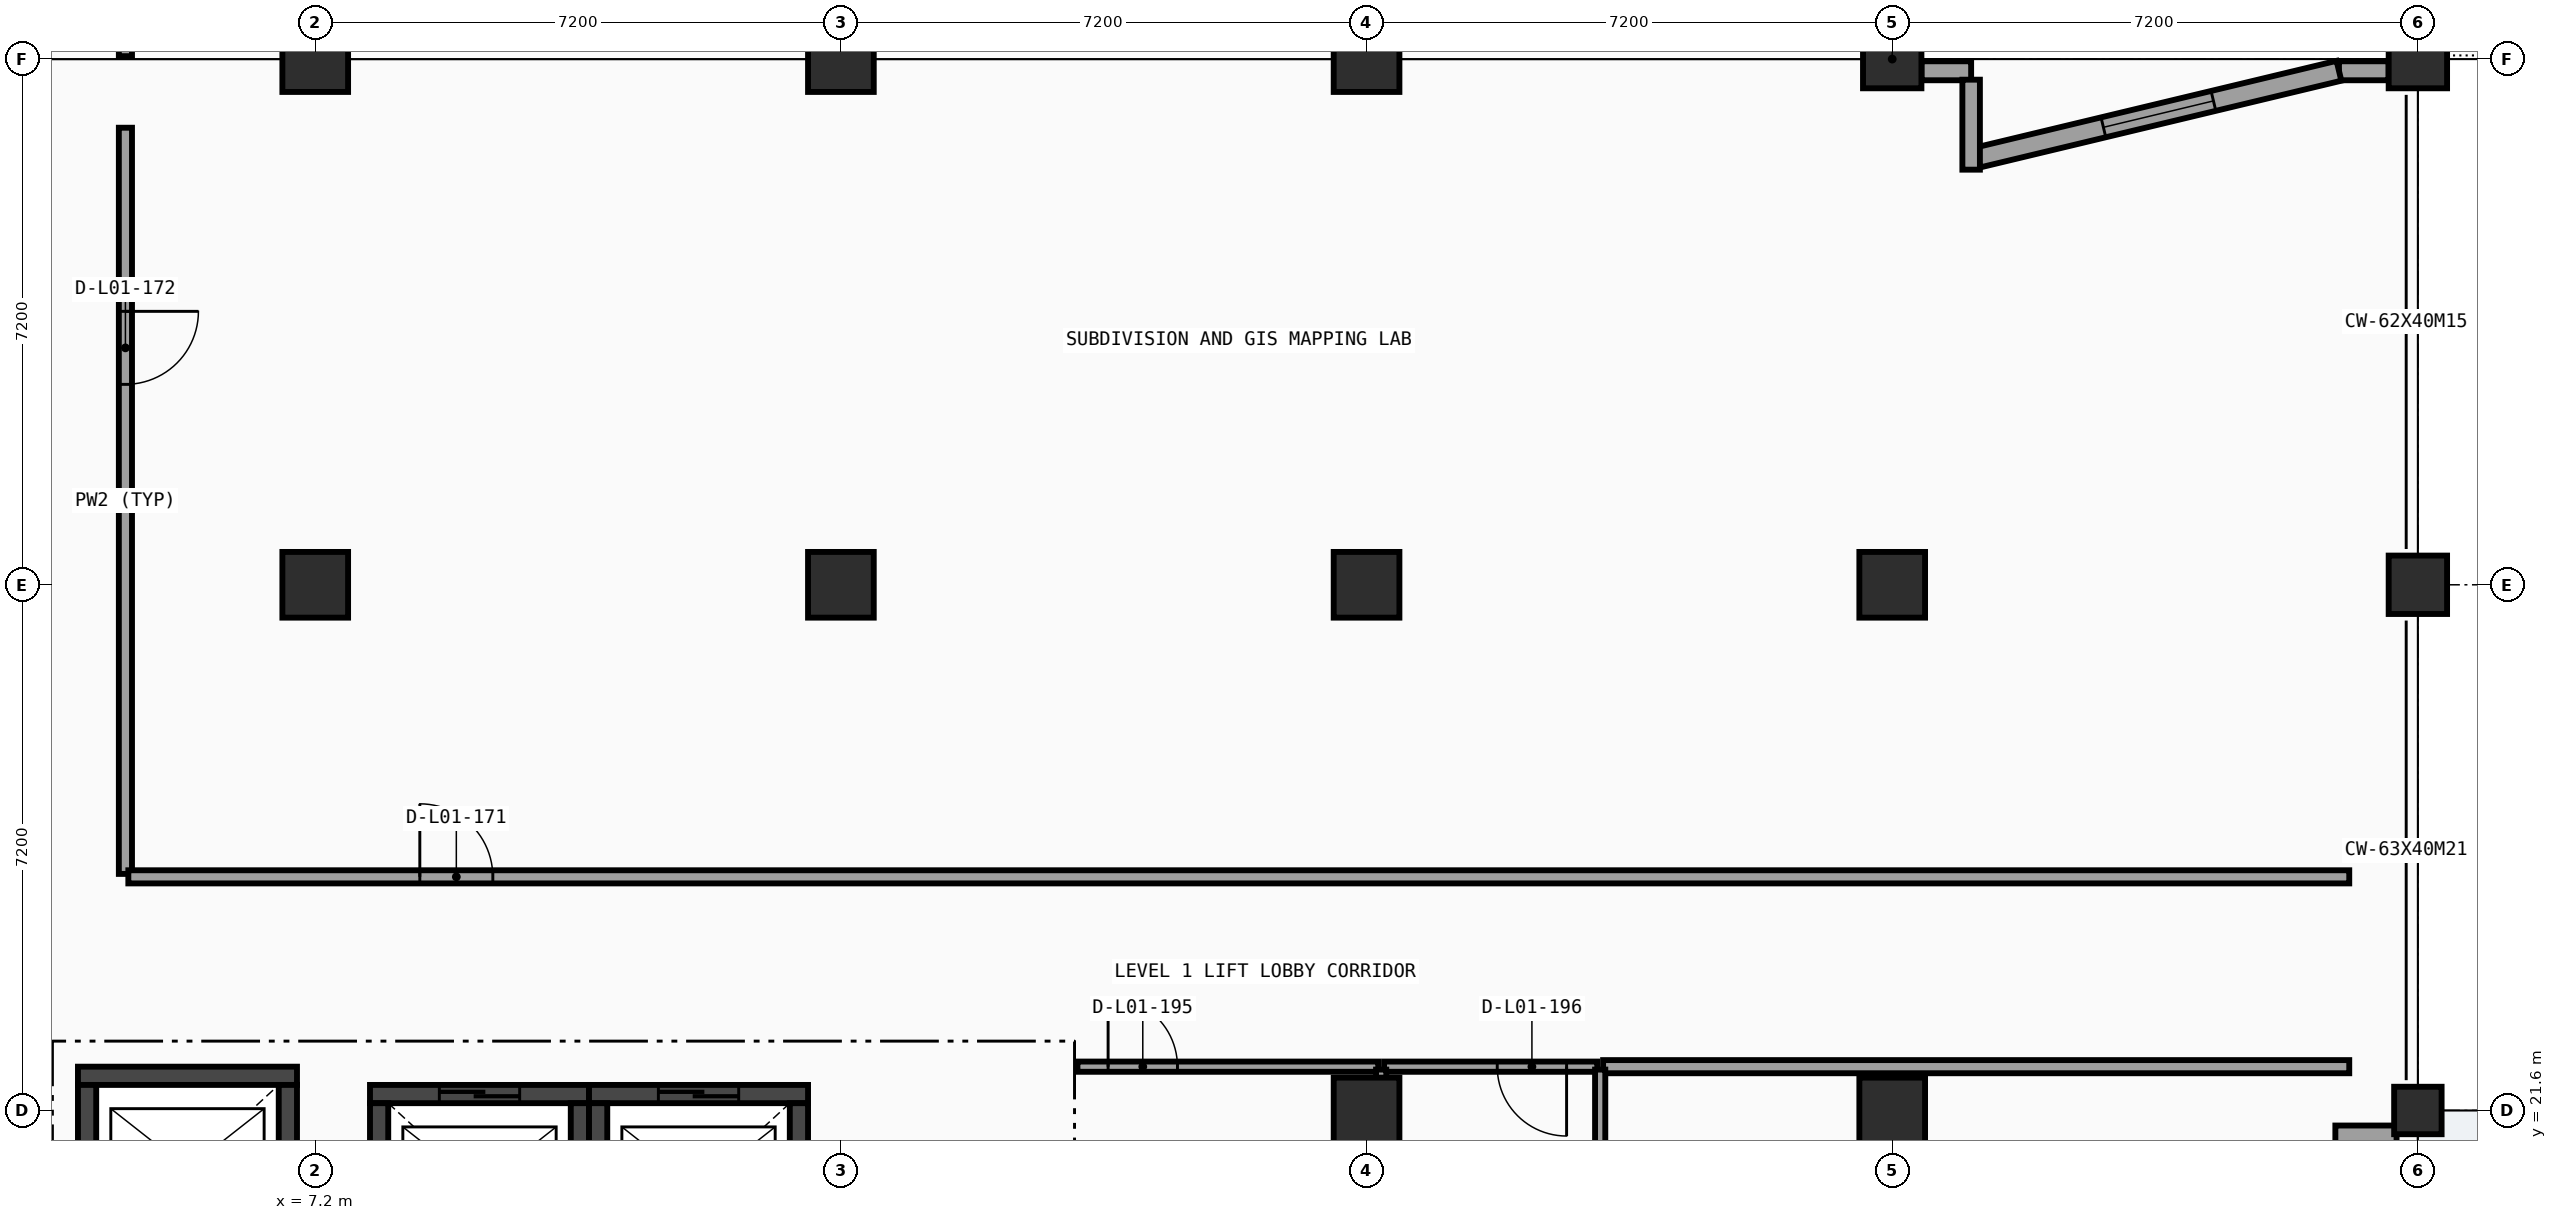
"""IFC4 building model, lengths in metres.
Left out: names, types, materials, properties, quantities, classifications, styles, units other than length and angle.
Written with IfcOpenShell. Run it as: python <this file> out.ifc"""

import sys

from ifc_helpers import new_model, si_unit, direction, frame, frame_2d, origin, origin_2d, place, context, subcontext, project, spatial, rectangle, extrude, element, fill, save


model = new_model("IFC4")
c1 = context("Model", 3, precision=1e-05, world=origin(), true_north=direction((0.0, 1.0)))
c2 = subcontext(c1, "Body", "Model", "MODEL_VIEW")
j1 = project(units=[si_unit("LENGTHUNIT", "METRE"), si_unit("PLANEANGLEUNIT", "RADIAN")], contexts=[c1])
p1 = place(None, origin())
s1 = spatial("IfcSite", under=j1, at=p1, CompositionType="ELEMENT")
p2 = place(p1, origin())
s2 = spatial("IfcBuilding", under=s1, at=p2, CompositionType="ELEMENT")
p3 = place(p2, frame((0.0, 0.0, 5.4)))
s3 = spatial("IfcBuildingStorey", under=s2, at=p3, CompositionType="ELEMENT", Elevation=5.4)
for number, where, z_axis, x_axis in (
    (1, (7.2, 28.8, 0.0), (0.0, 0.0, 1.0), (1.0, 0.0, 0.0)),
    (2, (7.2, 36.0, 0.0), (0.0, 0.0, 1.0), (1.0, 0.0, 0.0)),
    (3, (14.4, 28.8, 0.0), (0.0, 0.0, 1.0), (1.0, 0.0, 0.0)),
    (4, (14.4, 36.0, 0.0), (0.0, 0.0, 1.0), (1.0, 0.0, 0.0)),
    (5, (21.6, 21.6, 0.0), (0.0, 0.0, 1.0), (1.0, 0.0, 0.0)),
    (6, (21.6, 28.8, 0.0), (0.0, 0.0, 1.0), (1.0, 0.0, 0.0)),
    (7, (21.6, 36.0, 0.0), (0.0, 0.0, 1.0), (1.0, 0.0, 0.0)),
    (8, (28.8, 21.6, 0.0), (0.0, 0.0, 1.0), (1.0, 0.0, 0.0)),
    (9, (28.8, 28.8, 0.0), (0.0, 0.0, 1.0), (1.0, 0.0, 0.0)),
):
    element("IfcColumn", number, at=place(p3, frame(where, z_axis=z_axis, x_axis=x_axis)), inside=s3, PredefinedType="COLUMN", context=c2, shape_type="SweptSolid", body=[
        extrude(rectangle(XDim=0.9, YDim=0.9, at=origin_2d()), origin(), (0.0, 0.0, 1.0), 4.8),
    ])
p4 = place(p3, frame((28.8, 36.0, 0.0), z_axis=(0.0, 0.0, 1.0), x_axis=(1.0, 0.0, 0.0)))
e10 = element("IfcColumn", 10, at=p4, inside=s3, PredefinedType="COLUMN", context=c2, shape_type="SweptSolid", body=[
    extrude(rectangle(XDim=0.8, YDim=0.8, at=origin_2d()), origin(), (0.0, 0.0, 1.0), 4.8),
])
p5 = place(p3, frame((36.0, 21.6, 0.0), z_axis=(0.0, 0.0, 1.0), x_axis=(1.0, 0.0, 0.0)))
e11 = element("IfcColumn", 11, at=p5, inside=s3, PredefinedType="COLUMN", context=c2, shape_type="SweptSolid", body=[
    extrude(rectangle(XDim=0.65, YDim=0.65, at=origin_2d()), origin(), (0.0, 0.0, 1.0), 4.8),
])
for number, where, z_axis, x_axis in (
    (12, (36.0, 28.8, 0.0), (0.0, 0.0, 1.0), (1.0, 0.0, 0.0)),
    (13, (36.0, 36.0, 0.0), (0.0, 0.0, 1.0), (1.0, 0.0, 0.0)),
):
    element("IfcColumn", number, at=place(p3, frame(where, z_axis=z_axis, x_axis=x_axis)), inside=s3, PredefinedType="COLUMN", context=c2, shape_type="SweptSolid", body=[
        extrude(rectangle(XDim=0.8, YDim=0.8, at=origin_2d()), origin(), (0.0, 0.0, 1.0), 4.8),
    ])
p6 = place(p3, frame((35.037, 21.182, 0.0), z_axis=(0.0, 0.0, 1.0), x_axis=(0.233440062358, -0.972371193159, 0.0)))
e14 = element("IfcWall", 14, at=p6, inside=s3, PredefinedType="SOLIDWALL", context=c2, shape_type="SweptSolid", body=[
    extrude(rectangle(XDim=3.44, YDim=0.28, at=frame_2d((1.72, 0.0))), origin(), (0.0, 0.0, 1.0), 3.201),
])
p7 = place(p6, frame((0.945, 0.0, 0.8)))
e15 = element("IfcOpeningElement", 15, at=p7, cuts=e14, PredefinedType="OPENING", context=c2, shape_type="SweptSolid", body=[
    extrude(rectangle(XDim=1.55, YDim=1.8, at=frame_2d((0.775, 0.9))), frame((0.0, 0.15, 0.0), z_axis=(0.0, -1.0, 0.0), x_axis=(1.0, 0.0, 0.0)), (0.0, 0.0, 1.0), 0.3),
])
p8 = place(p3, frame((34.87, 21.274, 0.0), z_axis=(0.0, 0.0, 1.0), x_axis=(1.0, 0.0, 0.0)))
e16 = element("IfcWall", 16, at=p8, inside=s3, PredefinedType="SOLIDWALL", context=c2, shape_type="SweptSolid", body=[
    extrude(rectangle(XDim=0.838, YDim=0.24, at=frame_2d((0.419, 0.0))), origin(), (0.0, 0.0, 1.0), 3.201),
])
for number, where, z_axis, x_axis in (
    (17, (29.201, 35.84, 0.0), (0.0, 0.0, 1.0), (1.0, 0.0, 0.0)),
    (18, (34.919, 35.84, 0.0), (0.0, 0.0, 1.0), (1.0, 0.0, 0.0)),
):
    element("IfcWall", number, at=place(p3, frame(where, z_axis=z_axis, x_axis=x_axis)), inside=s3, PredefinedType="SOLIDWALL", context=c2, shape_type="SweptSolid", body=[
        extrude(rectangle(XDim=0.68, YDim=0.26, at=frame_2d((0.34, 0.0))), origin(), (0.0, 0.0, 1.0), 3.751),
    ])
p9 = place(p3, frame((29.973, 34.653, 0.0), z_axis=(0.0, 0.0, 1.0), x_axis=(0.972362024801, 0.233478248933, 0.0)))
e19 = element("IfcWall", 19, at=p9, inside=s3, PredefinedType="SOLIDWALL", context=c2, shape_type="SweptSolid", body=[
    extrude(rectangle(XDim=5.086, YDim=0.28, at=frame_2d((2.543, 0.0))), origin(), (0.0, 0.0, 1.0), 3.751),
])
p10 = place(p9, frame((1.768, 0.0, 0.8)))
e20 = element("IfcOpeningElement", 20, at=p10, cuts=e19, PredefinedType="OPENING", context=c2, shape_type="SweptSolid", body=[
    extrude(rectangle(XDim=1.55, YDim=1.8, at=frame_2d((0.775, 0.9))), frame((0.0, 0.15, 0.0), z_axis=(0.0, -1.0, 0.0), x_axis=(1.0, 0.0, 0.0)), (0.0, 0.0, 1.0), 0.3),
])
p11 = place(p3, frame((29.881, 34.486, 0.0), z_axis=(0.0, 0.0, 1.0), x_axis=(0.0, 1.0, 0.0)))
e21 = element("IfcWall", 21, at=p11, inside=s3, PredefinedType="SOLIDWALL", context=c2, shape_type="SweptSolid", body=[
    extrude(rectangle(XDim=1.232, YDim=0.24, at=frame_2d((0.616, 0.0))), origin(), (0.0, 0.0, 1.0), 4.52),
])
p12 = place(p3, frame((6.95, 22.075, 0.0), z_axis=(0.0, 0.0, 1.0), x_axis=(-1.0, 0.0, 0.0)))
e22 = element("IfcWall", 22, at=p12, inside=s3, PredefinedType="SHEAR", context=c2, shape_type="SweptSolid", body=[
    extrude(rectangle(XDim=3.0, YDim=0.25, at=frame_2d((1.5, 0.0))), origin(), (0.0, 0.0, 1.0), 4.52),
])
for number, where, z_axis, x_axis in (
    (23, (4.075, 21.95, 0.0), (0.0, 0.0, 1.0), (0.0, -1.0, 0.0)),
    (24, (6.825, 19.65, 0.0), (0.0, 0.0, 1.0), (0.0, 1.0, 0.0)),
):
    element("IfcWall", number, at=place(p3, frame(where, z_axis=z_axis, x_axis=x_axis)), inside=s3, PredefinedType="SHEAR", context=c2, shape_type="SweptSolid", body=[
        extrude(rectangle(XDim=2.3, YDim=0.25, at=frame_2d((1.15, 0.0))), origin(), (0.0, 0.0, 1.0), 4.52),
    ])
p13 = place(p3, frame((10.95, 21.825, 0.0), z_axis=(0.0, 0.0, 1.0), x_axis=(-1.0, 0.0, 0.0)))
e25 = element("IfcWall", 25, at=p13, inside=s3, PredefinedType="SHEAR", context=c2, shape_type="SweptSolid", body=[
    extrude(rectangle(XDim=3.0, YDim=0.25, at=frame_2d((1.5, 0.0))), origin(), (0.0, 0.0, 1.0), 4.52),
])
p14 = place(p13, frame((0.95, 0.0, 0.0)))
e26 = element("IfcOpeningElement", 26, at=p14, cuts=e25, PredefinedType="OPENING", context=c2, shape_type="SweptSolid", body=[
    extrude(rectangle(XDim=1.1, YDim=2.1, at=frame_2d((0.55, 1.05))), frame((0.0, 0.135, 0.0), z_axis=(0.0, -1.0, 0.0), x_axis=(1.0, 0.0, 0.0)), (0.0, 0.0, 1.0), 0.27),
])
for number, where, z_axis, x_axis in (
    (27, (8.075, 21.7, 0.0), (0.0, 0.0, 1.0), (0.0, -1.0, 0.0)),
    (28, (10.825, 19.4, 0.0), (0.0, 0.0, 1.0), (0.0, 1.0, 0.0)),
):
    element("IfcWall", number, at=place(p3, frame(where, z_axis=z_axis, x_axis=x_axis)), inside=s3, PredefinedType="SHEAR", context=c2, shape_type="SweptSolid", body=[
        extrude(rectangle(XDim=2.3, YDim=0.25, at=frame_2d((1.15, 0.0))), origin(), (0.0, 0.0, 1.0), 4.52),
    ])
p15 = place(p3, frame((13.95, 21.825, 0.0), z_axis=(0.0, 0.0, 1.0), x_axis=(-1.0, 0.0, 0.0)))
e29 = element("IfcWall", 29, at=p15, inside=s3, PredefinedType="SHEAR", context=c2, shape_type="SweptSolid", body=[
    extrude(rectangle(XDim=3.0, YDim=0.25, at=frame_2d((1.5, 0.0))), origin(), (0.0, 0.0, 1.0), 4.52),
])
p16 = place(p15, frame((0.95, 0.0, 0.0)))
e30 = element("IfcOpeningElement", 30, at=p16, cuts=e29, PredefinedType="OPENING", context=c2, shape_type="SweptSolid", body=[
    extrude(rectangle(XDim=1.1, YDim=2.1, at=frame_2d((0.55, 1.05))), frame((0.0, 0.135, 0.0), z_axis=(0.0, -1.0, 0.0), x_axis=(1.0, 0.0, 0.0)), (0.0, 0.0, 1.0), 0.27),
])
for number, where, z_axis, x_axis in (
    (31, (11.075, 21.7, 0.0), (0.0, 0.0, 1.0), (0.0, -1.0, 0.0)),
    (32, (13.825, 19.4, 0.0), (0.0, 0.0, 1.0), (0.0, 1.0, 0.0)),
):
    element("IfcWall", number, at=place(p3, frame(where, z_axis=z_axis, x_axis=x_axis)), inside=s3, PredefinedType="SHEAR", context=c2, shape_type="SweptSolid", body=[
        extrude(rectangle(XDim=2.3, YDim=0.25, at=frame_2d((1.15, 0.0))), origin(), (0.0, 0.0, 1.0), 4.52),
    ])
p17 = place(p3, frame((4.6, 24.84, 0.0), z_axis=(0.0, 0.0, 1.0), x_axis=(0.0, 1.0, 0.0)))
e33 = element("IfcWall", 33, at=p17, inside=s3, PredefinedType="PARTITIONING", context=c2, shape_type="SweptSolid", body=[
    extrude(rectangle(XDim=10.22, YDim=0.18, at=frame_2d((5.11, 0.0))), origin(), (0.0, 0.0, 1.0), 3.889),
])
p18 = place(p17, frame((6.705, 0.0, 0.0)))
e34 = element("IfcOpeningElement", 34, at=p18, cuts=e33, PredefinedType="OPENING", context=c2, shape_type="SweptSolid", body=[
    extrude(rectangle(XDim=1.0, YDim=2.1, at=frame_2d((0.5, 1.05))), frame((0.0, 0.1, 0.0), z_axis=(0.0, -1.0, 0.0), x_axis=(1.0, 0.0, 0.0)), (0.0, 0.0, 1.0), 0.2),
])
p19 = place(p3, frame((4.6, 36.04, 0.0), z_axis=(0.0, 0.0, 1.0), x_axis=(0.0, 1.0, 0.0)))
e35 = element("IfcWall", 35, at=p19, inside=s3, PredefinedType="PARTITIONING", context=c2, shape_type="SweptSolid", body=[
    extrude(rectangle(XDim=14.32, YDim=0.18, at=frame_2d((7.16, 0.0))), origin(), (0.0, 0.0, 1.0), 3.889),
])
p20 = place(p19, frame((3.54, 0.0, 0.0)))
e36 = element("IfcOpeningElement", 36, at=p20, cuts=e35, PredefinedType="OPENING", context=c2, shape_type="SweptSolid", body=[
    extrude(rectangle(XDim=1.0, YDim=2.1, at=frame_2d((0.5, 1.05))), frame((0.0, 0.1, 0.0), z_axis=(0.0, -1.0, 0.0), x_axis=(1.0, 0.0, 0.0)), (0.0, 0.0, 1.0), 0.2),
])
p21 = place(p3, frame((24.84, 22.2, 0.0), z_axis=(0.0, 0.0, 1.0), x_axis=(1.0, 0.0, 0.0)))
e37 = element("IfcWall", 37, at=p21, inside=s3, PredefinedType="PARTITIONING", context=c2, shape_type="SweptSolid", body=[
    extrude(rectangle(XDim=10.22, YDim=0.18, at=frame_2d((5.11, 0.0))), origin(), (0.0, 0.0, 1.0), 3.801),
])
p22 = place(p3, frame((4.64, 24.8, 0.0), z_axis=(0.0, 0.0, 1.0), x_axis=(1.0, 0.0, 0.0)))
e38 = element("IfcWall", 38, at=p22, inside=s3, PredefinedType="PARTITIONING", context=c2, shape_type="SweptSolid", body=[
    extrude(rectangle(XDim=30.42, YDim=0.18, at=frame_2d((15.21, 0.0))), origin(), (0.0, 0.0, 1.0), 3.801),
])
p23 = place(p22, frame((3.992, 0.0, 0.0)))
e39 = element("IfcOpeningElement", 39, at=p23, cuts=e38, PredefinedType="OPENING", context=c2, shape_type="SweptSolid", body=[
    extrude(rectangle(XDim=1.0, YDim=2.1, at=frame_2d((0.5, 1.05))), frame((0.0, 0.1, 0.0), z_axis=(0.0, -1.0, 0.0), x_axis=(1.0, 0.0, 0.0)), (0.0, 0.0, 1.0), 0.2),
])
p24 = place(p3, frame((17.64, 22.2, 0.0), z_axis=(0.0, 0.0, 1.0), x_axis=(1.0, 0.0, 0.0)))
e40 = element("IfcWall", 40, at=p24, inside=s3, PredefinedType="PARTITIONING", context=c2, shape_type="SweptSolid", body=[
    extrude(rectangle(XDim=4.12, YDim=0.14, at=frame_2d((2.06, 0.0))), origin(), (0.0, 0.0, 1.0), 3.801),
])
p25 = place(p24, frame((0.42, 0.0, 0.0)))
e41 = element("IfcOpeningElement", 41, at=p25, cuts=e40, PredefinedType="OPENING", context=c2, shape_type="SweptSolid", body=[
    extrude(rectangle(XDim=0.95, YDim=2.08, at=frame_2d((0.475, 1.04))), frame((0.0, 0.08, 0.0), z_axis=(0.0, -1.0, 0.0), x_axis=(1.0, 0.0, 0.0)), (0.0, 0.0, 1.0), 0.16),
])
p26 = place(p3, frame((21.84, 22.2, 0.0), z_axis=(0.0, 0.0, 1.0), x_axis=(1.0, 0.0, 0.0)))
e42 = element("IfcWall", 42, at=p26, inside=s3, PredefinedType="PARTITIONING", context=c2, shape_type="SweptSolid", body=[
    extrude(rectangle(XDim=2.92, YDim=0.14, at=frame_2d((1.46, 0.0))), origin(), (0.0, 0.0, 1.0), 4.52),
])
p27 = place(p26, frame((1.55, 0.0, 0.0)))
e43 = element("IfcOpeningElement", 43, at=p27, cuts=e42, PredefinedType="OPENING", context=c2, shape_type="SweptSolid", body=[
    extrude(rectangle(XDim=0.95, YDim=2.08, at=frame_2d((0.475, 1.04))), frame((0.0, 0.08, 0.0), z_axis=(0.0, -1.0, 0.0), x_axis=(1.0, 0.0, 0.0)), (0.0, 0.0, 1.0), 0.16),
])
p28 = place(p3, frame((24.8, 15.04, 0.0), z_axis=(0.0, 0.0, 1.0), x_axis=(0.0, 1.0, 0.0)))
e44 = element("IfcWall", 44, at=p28, inside=s3, PredefinedType="PARTITIONING", context=c2, shape_type="SweptSolid", body=[
    extrude(rectangle(XDim=7.12, YDim=0.14, at=frame_2d((3.56, 0.0))), origin(), (0.0, 0.0, 1.0), 3.889),
])
p29 = place(p3, frame((21.8, 18.44, 0.0), z_axis=(0.0, 0.0, 1.0), x_axis=(0.0, 1.0, 0.0)))
e45 = element("IfcWall", 45, at=p29, inside=s3, PredefinedType="PARTITIONING", context=c2, shape_type="SweptSolid", body=[
    extrude(rectangle(XDim=3.72, YDim=0.14, at=frame_2d((1.86, 0.0))), origin(), (0.0, 0.0, 1.0), 3.801),
])
p30 = place(p10, origin())
e46 = element("IfcWindow", 46, at=p30, inside=s3, PartitioningType="SINGLE_PANEL", PredefinedType="WINDOW", context=c2, shape_type="SweptSolid", body=[
    extrude(rectangle(XDim=1.55, YDim=1.8, at=frame_2d((0.775, 0.9))), frame((0.0, 0.03, 0.0), z_axis=(0.0, -1.0, 0.0), x_axis=(1.0, 0.0, 0.0)), (0.0, 0.0, 1.0), 0.06),
])
fill(e20, e46)
p31 = place(p14, origin())
e47 = element("IfcDoor", 47, at=p31, inside=s3, OperationType="SLIDING_TO_LEFT", PredefinedType="DOOR", context=c2, shape_type="SweptSolid", body=[
    extrude(rectangle(XDim=1.1, YDim=2.1, at=frame_2d((0.55, 1.05))), frame((0.0, 0.025, 0.0), z_axis=(0.0, -1.0, 0.0), x_axis=(1.0, 0.0, 0.0)), (0.0, 0.0, 1.0), 0.05),
])
fill(e26, e47)
p32 = place(p16, origin())
e48 = element("IfcDoor", 48, at=p32, inside=s3, OperationType="SLIDING_TO_LEFT", PredefinedType="DOOR", context=c2, shape_type="SweptSolid", body=[
    extrude(rectangle(XDim=1.1, YDim=2.1, at=frame_2d((0.55, 1.05))), frame((0.0, 0.025, 0.0), z_axis=(0.0, -1.0, 0.0), x_axis=(1.0, 0.0, 0.0)), (0.0, 0.0, 1.0), 0.05),
])
fill(e30, e48)
p33 = place(p23, origin())
e49 = element("IfcDoor", 49, at=p33, inside=s3, OperationType="SINGLE_SWING_LEFT", PredefinedType="DOOR", context=c2, shape_type="SweptSolid", body=[
    extrude(rectangle(XDim=1.0, YDim=2.1, at=frame_2d((0.5, 1.05))), frame((0.0, 0.025, 0.0), z_axis=(0.0, -1.0, 0.0), x_axis=(1.0, 0.0, 0.0)), (0.0, 0.0, 1.0), 0.05),
])
fill(e39, e49)
p34 = place(p18, origin())
e50 = element("IfcDoor", 50, at=p34, inside=s3, OperationType="SINGLE_SWING_RIGHT", PredefinedType="DOOR", context=c2, shape_type="SweptSolid", body=[
    extrude(rectangle(XDim=1.0, YDim=2.1, at=frame_2d((0.5, 1.05))), frame((0.0, 0.025, 0.0), z_axis=(0.0, -1.0, 0.0), x_axis=(1.0, 0.0, 0.0)), (0.0, 0.0, 1.0), 0.05),
])
fill(e34, e50)
p35 = place(p25, origin())
e51 = element("IfcDoor", 51, at=p35, inside=s3, OperationType="SINGLE_SWING_LEFT", PredefinedType="DOOR", context=c2, shape_type="SweptSolid", body=[
    extrude(rectangle(XDim=0.95, YDim=2.08, at=frame_2d((0.475, 1.04))), frame((0.0, 0.025, 0.0), z_axis=(0.0, -1.0, 0.0), x_axis=(1.0, 0.0, 0.0)), (0.0, 0.0, 1.0), 0.05),
])
fill(e41, e51)
p36 = place(p27, origin())
e52 = element("IfcDoor", 52, at=p36, inside=s3, OperationType="SINGLE_SWING_RIGHT", PredefinedType="DOOR", context=c2, shape_type="SweptSolid", body=[
    extrude(rectangle(XDim=0.95, YDim=2.08, at=frame_2d((0.475, 1.04))), frame((0.0, 0.025, 0.0), z_axis=(0.0, -1.0, 0.0), x_axis=(1.0, 0.0, 0.0)), (0.0, 0.0, 1.0), 0.05),
])
fill(e43, e52)
save(model, sys.argv[1])
